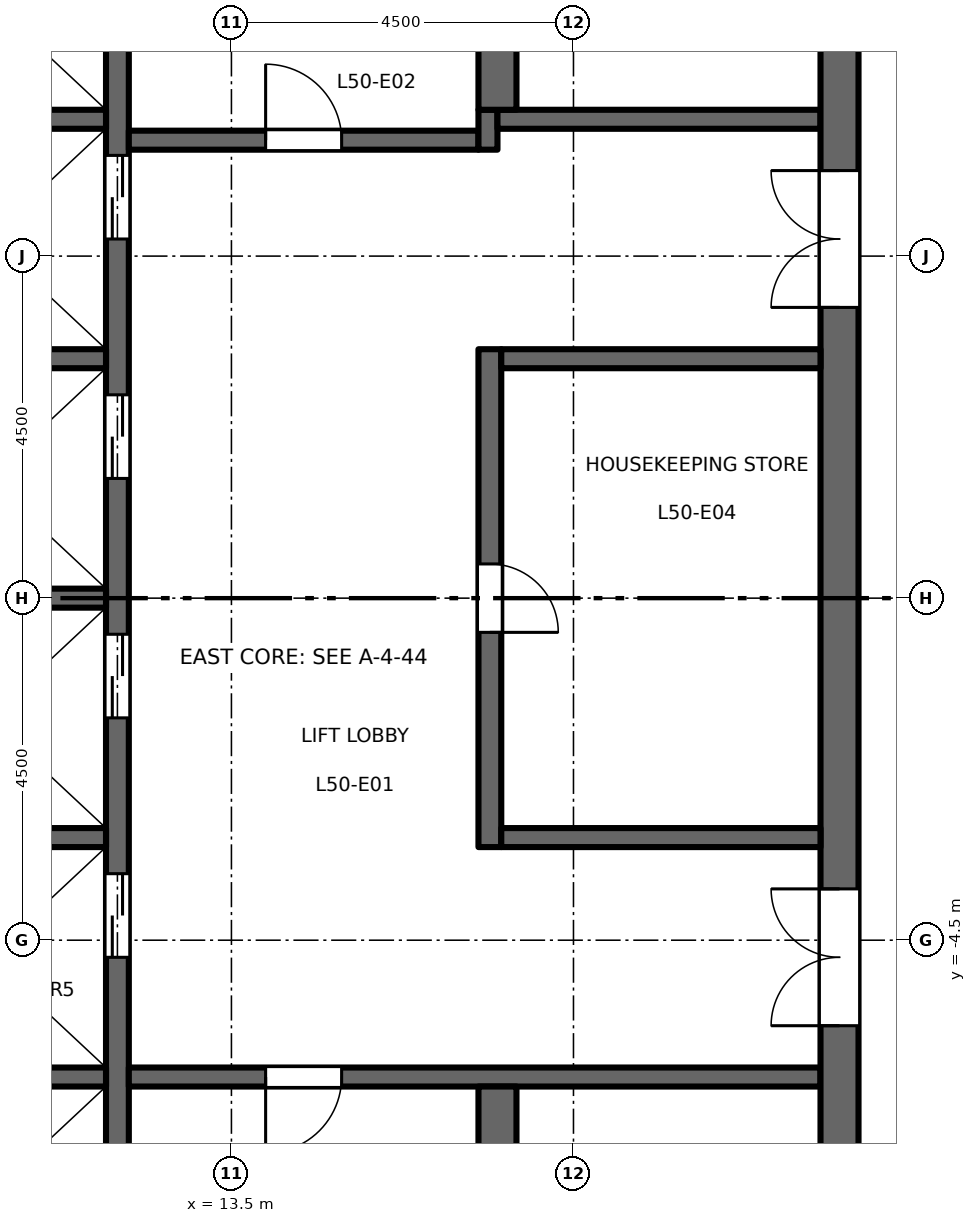
"""IFC4 building model, lengths in metres.
Left out: names, types, materials, properties, quantities, classifications, styles, units other than length and angle.
Written with IfcOpenShell. Run it as: python <this file> out.ifc"""

import sys

from ifc_helpers import new_model, si_unit, direction, frame, frame_2d, origin, place, context, subcontext, project, spatial, rectangle, extrude, element, fill, save


model = new_model("IFC4")
c1 = context("Model", 3, precision=1e-05, world=origin(), true_north=direction((0.0, 1.0)))
c2 = subcontext(c1, "Body", "Model", "MODEL_VIEW")
j1 = project(units=[si_unit("LENGTHUNIT", "METRE"), si_unit("PLANEANGLEUNIT", "RADIAN")], contexts=[c1])
p1 = place(None, origin())
s1 = spatial("IfcSite", under=j1, at=p1, CompositionType="ELEMENT")
p2 = place(p1, origin())
s2 = spatial("IfcBuilding", under=s1, at=p2, CompositionType="ELEMENT")
p3 = place(p2, frame((0.0, 0.0, 233.2)))
s3 = spatial("IfcBuildingStorey", under=s2, at=p3, CompositionType="ELEMENT", Elevation=233.2)
p4 = place(p3, frame((12.0, -9.45, 0.0), z_axis=(0.0, 0.0, 1.0), x_axis=(0.0, 1.0, 0.0)))
e1 = element("IfcWall", 1, at=p4, inside=s3, PredefinedType="SHEAR", context=c2, shape_type="SweptSolid", body=[
    extrude(rectangle(XDim=18.9, YDim=0.3, at=frame_2d((9.45, 0.0))), origin(), (0.0, 0.0, 1.0), 4.35),
])
p5 = place(p4, frame((4.725, 0.0, 0.0)))
e2 = element("IfcOpeningElement", 2, at=p5, cuts=e1, PredefinedType="OPENING", context=c2, shape_type="SweptSolid", body=[
    extrude(rectangle(XDim=1.1, YDim=2.1, at=frame_2d((0.55, 1.05))), frame((0.0, 0.16, 0.0), z_axis=(0.0, -1.0, 0.0), x_axis=(1.0, 0.0, 0.0)), (0.0, 0.0, 1.0), 0.32),
])
p6 = place(p4, frame((7.875, 0.0, 0.0)))
e3 = element("IfcOpeningElement", 3, at=p6, cuts=e1, PredefinedType="OPENING", context=c2, shape_type="SweptSolid", body=[
    extrude(rectangle(XDim=1.1, YDim=2.1, at=frame_2d((0.55, 1.05))), frame((0.0, 0.16, 0.0), z_axis=(0.0, -1.0, 0.0), x_axis=(1.0, 0.0, 0.0)), (0.0, 0.0, 1.0), 0.32),
])
p7 = place(p4, frame((11.025, 0.0, 0.0)))
e4 = element("IfcOpeningElement", 4, at=p7, cuts=e1, PredefinedType="OPENING", context=c2, shape_type="SweptSolid", body=[
    extrude(rectangle(XDim=1.1, YDim=2.1, at=frame_2d((0.55, 1.05))), frame((0.0, 0.16, 0.0), z_axis=(0.0, -1.0, 0.0), x_axis=(1.0, 0.0, 0.0)), (0.0, 0.0, 1.0), 0.32),
])
p8 = place(p4, frame((14.175, 0.0, 0.0)))
e5 = element("IfcOpeningElement", 5, at=p8, cuts=e1, PredefinedType="OPENING", context=c2, shape_type="SweptSolid", body=[
    extrude(rectangle(XDim=1.1, YDim=2.1, at=frame_2d((0.55, 1.05))), frame((0.0, 0.16, 0.0), z_axis=(0.0, -1.0, 0.0), x_axis=(1.0, 0.0, 0.0)), (0.0, 0.0, 1.0), 0.32),
])
p9 = place(p4, frame((16.725, 0.0, 0.0)))
e6 = element("IfcOpeningElement", 6, at=p9, cuts=e1, PredefinedType="OPENING", context=c2, shape_type="SweptSolid", body=[
    extrude(rectangle(XDim=1.2, YDim=2.1, at=frame_2d((0.6, 1.05))), frame((0.0, 0.16, 0.0), z_axis=(0.0, -1.0, 0.0), x_axis=(1.0, 0.0, 0.0)), (0.0, 0.0, 1.0), 0.32),
])
p10 = place(p4, frame((0.975, 0.0, 0.0)))
e7 = element("IfcOpeningElement", 7, at=p10, cuts=e1, PredefinedType="OPENING", context=c2, shape_type="SweptSolid", body=[
    extrude(rectangle(XDim=1.2, YDim=2.1, at=frame_2d((0.6, 1.05))), frame((0.0, 0.16, 0.0), z_axis=(0.0, -1.0, 0.0), x_axis=(1.0, 0.0, 0.0)), (0.0, 0.0, 1.0), 0.32),
])
p11 = place(p3, frame((12.15, 6.025, 0.0), z_axis=(0.0, 0.0, 1.0), x_axis=(1.0, 0.0, 0.0)))
e8 = element("IfcWall", 8, at=p11, inside=s3, PredefinedType="SHEAR", context=c2, shape_type="SweptSolid", body=[
    extrude(rectangle(XDim=4.6, YDim=0.25, at=frame_2d((2.3, 0.0))), origin(), (0.0, 0.0, 1.0), 4.35),
])
p12 = place(p11, frame((1.8, 0.0, 0.0)))
e9 = element("IfcOpeningElement", 9, at=p12, cuts=e8, PredefinedType="OPENING", context=c2, shape_type="SweptSolid", body=[
    extrude(rectangle(XDim=1.0, YDim=2.1, at=frame_2d((0.5, 1.05))), frame((0.0, 0.135, 0.0), z_axis=(0.0, -1.0, 0.0), x_axis=(1.0, 0.0, 0.0)), (0.0, 0.0, 1.0), 0.27),
])
p13 = place(p3, frame((16.875, 5.9, 0.0), z_axis=(0.0, 0.0, 1.0), x_axis=(0.0, 1.0, 0.0)))
e10 = element("IfcWall", 10, at=p13, inside=s3, PredefinedType="SHEAR", context=c2, shape_type="SweptSolid", body=[
    extrude(rectangle(XDim=0.525, YDim=0.25, at=frame_2d((0.263, 0.0))), origin(), (0.0, 0.0, 1.0), 4.35),
])
p14 = place(p3, frame((17.0, 6.3, 0.0), z_axis=(0.0, 0.0, 1.0), x_axis=(1.0, 0.0, 0.0)))
e11 = element("IfcWall", 11, at=p14, inside=s3, PredefinedType="SHEAR", context=c2, shape_type="SweptSolid", body=[
    extrude(rectangle(XDim=4.25, YDim=0.25, at=frame_2d((2.125, 0.0))), origin(), (0.0, 0.0, 1.0), 4.35),
])
p15 = place(p3, frame((12.15, -6.3, 0.0), z_axis=(0.0, 0.0, 1.0), x_axis=(1.0, 0.0, 0.0)))
e12 = element("IfcWall", 12, at=p15, inside=s3, PredefinedType="SHEAR", context=c2, shape_type="SweptSolid", body=[
    extrude(rectangle(XDim=9.1, YDim=0.25, at=frame_2d((4.55, 0.0))), origin(), (0.0, 0.0, 1.0), 4.35),
])
p16 = place(p15, frame((1.8, 0.0, 0.0)))
e13 = element("IfcOpeningElement", 13, at=p16, cuts=e12, PredefinedType="OPENING", context=c2, shape_type="SweptSolid", body=[
    extrude(rectangle(XDim=1.0, YDim=2.1, at=frame_2d((0.5, 1.05))), frame((0.0, 0.135, 0.0), z_axis=(0.0, -1.0, 0.0), x_axis=(1.0, 0.0, 0.0)), (0.0, 0.0, 1.0), 0.27),
])
p17 = place(p3, frame((21.5, -13.0, 0.0), z_axis=(0.0, 0.0, 1.0), x_axis=(0.0, 1.0, 0.0)))
e14 = element("IfcWall", 14, at=p17, inside=s3, PredefinedType="SHEAR", context=c2, shape_type="SweptSolid", body=[
    extrude(rectangle(XDim=26.0, YDim=0.5, at=frame_2d((13.0, 0.0))), origin(), (0.0, 0.0, 1.0), 4.35),
])
p18 = place(p17, frame((16.825, 0.0, 0.0)))
e15 = element("IfcOpeningElement", 15, at=p18, cuts=e14, PredefinedType="OPENING", context=c2, shape_type="SweptSolid", body=[
    extrude(rectangle(XDim=1.8, YDim=2.1, at=frame_2d((0.9, 1.05))), frame((0.0, 0.26, 0.0), z_axis=(0.0, -1.0, 0.0), x_axis=(1.0, 0.0, 0.0)), (0.0, 0.0, 1.0), 0.52),
])
p19 = place(p17, frame((7.375, 0.0, 0.0)))
e16 = element("IfcOpeningElement", 16, at=p19, cuts=e14, PredefinedType="OPENING", context=c2, shape_type="SweptSolid", body=[
    extrude(rectangle(XDim=1.8, YDim=2.1, at=frame_2d((0.9, 1.05))), frame((0.0, 0.26, 0.0), z_axis=(0.0, -1.0, 0.0), x_axis=(1.0, 0.0, 0.0)), (0.0, 0.0, 1.0), 0.52),
])
p20 = place(p3, frame((16.9, -3.275, 0.0), z_axis=(0.0, 0.0, 1.0), x_axis=(0.0, 1.0, 0.0)))
e17 = element("IfcWall", 17, at=p20, inside=s3, PredefinedType="SHEAR", context=c2, shape_type="SweptSolid", body=[
    extrude(rectangle(XDim=6.55, YDim=0.3, at=frame_2d((3.275, 0.0))), origin(), (0.0, 0.0, 1.0), 4.35),
])
p21 = place(p20, frame((2.825, 0.0, 0.0)))
e18 = element("IfcOpeningElement", 18, at=p21, cuts=e17, PredefinedType="OPENING", context=c2, shape_type="SweptSolid", body=[
    extrude(rectangle(XDim=0.9, YDim=2.1, at=frame_2d((0.45, 1.05))), frame((0.0, 0.16, 0.0), z_axis=(0.0, -1.0, 0.0), x_axis=(1.0, 0.0, 0.0)), (0.0, 0.0, 1.0), 0.32),
])
for number, where, z_axis, x_axis in (
    (19, (17.05, 3.15, 0.0), (0.0, 0.0, 1.0), (1.0, 0.0, 0.0)),
    (20, (17.05, -3.15, 0.0), (0.0, 0.0, 1.0), (1.0, 0.0, 0.0)),
):
    element("IfcWall", number, at=place(p3, frame(where, z_axis=z_axis, x_axis=x_axis)), inside=s3, PredefinedType="SHEAR", context=c2, shape_type="SweptSolid", body=[
        extrude(rectangle(XDim=4.2, YDim=0.25, at=frame_2d((2.1, 0.0))), origin(), (0.0, 0.0, 1.0), 4.35),
    ])
for number, where, z_axis, x_axis in (
    (21, (17.0, 6.425, 0.0), (0.0, 0.0, 1.0), (0.0, 1.0, 0.0)),
    (22, (17.0, -13.0, 0.0), (0.0, 0.0, 1.0), (0.0, 1.0, 0.0)),
):
    element("IfcWall", number, at=place(p3, frame(where, z_axis=z_axis, x_axis=x_axis)), inside=s3, PredefinedType="SHEAR", context=c2, shape_type="SweptSolid", body=[
        extrude(rectangle(XDim=6.575, YDim=0.5, at=frame_2d((3.288, 0.0))), origin(), (0.0, 0.0, 1.0), 4.35),
    ])
for number, where, z_axis, x_axis in (
    (23, (8.75, 0.0, 0.0), (0.0, 0.0, 1.0), (1.0, 0.0, 0.0)),
    (24, (8.75, 3.15, 0.0), (0.0, 0.0, 1.0), (1.0, 0.0, 0.0)),
    (25, (8.75, 6.3, 0.0), (0.0, 0.0, 1.0), (1.0, 0.0, 0.0)),
    (26, (8.75, -3.15, 0.0), (0.0, 0.0, 1.0), (1.0, 0.0, 0.0)),
    (27, (8.75, -6.3, 0.0), (0.0, 0.0, 1.0), (1.0, 0.0, 0.0)),
):
    element("IfcWall", number, at=place(p3, frame(where, z_axis=z_axis, x_axis=x_axis)), inside=s3, PredefinedType="SHEAR", context=c2, shape_type="SweptSolid", body=[
        extrude(rectangle(XDim=3.1, YDim=0.25, at=frame_2d((1.55, 0.0))), origin(), (0.0, 0.0, 1.0), 4.35),
    ])
p22 = place(p12, origin())
e28 = element("IfcDoor", 28, at=p22, inside=s3, OperationType="SINGLE_SWING_RIGHT", PredefinedType="DOOR", context=c2, shape_type="SweptSolid", body=[
    extrude(rectangle(XDim=1.0, YDim=2.1, at=frame_2d((0.5, 1.05))), frame((0.0, 0.025, 0.0), z_axis=(0.0, -1.0, 0.0), x_axis=(1.0, 0.0, 0.0)), (0.0, 0.0, 1.0), 0.05),
])
fill(e9, e28)
p23 = place(p16, origin())
e29 = element("IfcDoor", 29, at=p23, inside=s3, OperationType="SINGLE_SWING_LEFT", PredefinedType="DOOR", context=c2, shape_type="SweptSolid", body=[
    extrude(rectangle(XDim=1.0, YDim=2.1, at=frame_2d((0.5, 1.05))), frame((0.0, 0.025, 0.0), z_axis=(0.0, -1.0, 0.0), x_axis=(1.0, 0.0, 0.0)), (0.0, 0.0, 1.0), 0.05),
])
fill(e13, e29)
p24 = place(p18, origin())
e30 = element("IfcDoor", 30, at=p24, inside=s3, OperationType="DOUBLE_DOOR_DOUBLE_SWING", PredefinedType="DOOR", context=c2, shape_type="SweptSolid", body=[
    extrude(rectangle(XDim=1.8, YDim=2.1, at=frame_2d((0.9, 1.05))), frame((0.0, 0.025, 0.0), z_axis=(0.0, -1.0, 0.0), x_axis=(1.0, 0.0, 0.0)), (0.0, 0.0, 1.0), 0.05),
])
fill(e15, e30)
p25 = place(p19, origin())
e31 = element("IfcDoor", 31, at=p25, inside=s3, OperationType="DOUBLE_DOOR_DOUBLE_SWING", PredefinedType="DOOR", context=c2, shape_type="SweptSolid", body=[
    extrude(rectangle(XDim=1.8, YDim=2.1, at=frame_2d((0.9, 1.05))), frame((0.0, 0.025, 0.0), z_axis=(0.0, -1.0, 0.0), x_axis=(1.0, 0.0, 0.0)), (0.0, 0.0, 1.0), 0.05),
])
fill(e16, e31)
p26 = place(p5, origin())
e32 = element("IfcDoor", 32, at=p26, inside=s3, OperationType="DOUBLE_DOOR_SLIDING", PredefinedType="DOOR", context=c2, shape_type="SweptSolid", body=[
    extrude(rectangle(XDim=1.1, YDim=2.1, at=frame_2d((0.55, 1.05))), frame((0.0, 0.025, 0.0), z_axis=(0.0, -1.0, 0.0), x_axis=(1.0, 0.0, 0.0)), (0.0, 0.0, 1.0), 0.05),
])
fill(e2, e32)
p27 = place(p6, origin())
e33 = element("IfcDoor", 33, at=p27, inside=s3, OperationType="DOUBLE_DOOR_SLIDING", PredefinedType="DOOR", context=c2, shape_type="SweptSolid", body=[
    extrude(rectangle(XDim=1.1, YDim=2.1, at=frame_2d((0.55, 1.05))), frame((0.0, 0.025, 0.0), z_axis=(0.0, -1.0, 0.0), x_axis=(1.0, 0.0, 0.0)), (0.0, 0.0, 1.0), 0.05),
])
fill(e3, e33)
p28 = place(p7, origin())
e34 = element("IfcDoor", 34, at=p28, inside=s3, OperationType="DOUBLE_DOOR_SLIDING", PredefinedType="DOOR", context=c2, shape_type="SweptSolid", body=[
    extrude(rectangle(XDim=1.1, YDim=2.1, at=frame_2d((0.55, 1.05))), frame((0.0, 0.025, 0.0), z_axis=(0.0, -1.0, 0.0), x_axis=(1.0, 0.0, 0.0)), (0.0, 0.0, 1.0), 0.05),
])
fill(e4, e34)
p29 = place(p8, origin())
e35 = element("IfcDoor", 35, at=p29, inside=s3, OperationType="DOUBLE_DOOR_SLIDING", PredefinedType="DOOR", context=c2, shape_type="SweptSolid", body=[
    extrude(rectangle(XDim=1.1, YDim=2.1, at=frame_2d((0.55, 1.05))), frame((0.0, 0.025, 0.0), z_axis=(0.0, -1.0, 0.0), x_axis=(1.0, 0.0, 0.0)), (0.0, 0.0, 1.0), 0.05),
])
fill(e5, e35)
p30 = place(p21, origin())
e36 = element("IfcDoor", 36, at=p30, inside=s3, OperationType="SINGLE_SWING_LEFT", PredefinedType="DOOR", context=c2, shape_type="SweptSolid", body=[
    extrude(rectangle(XDim=0.9, YDim=2.1, at=frame_2d((0.45, 1.05))), frame((0.0, 0.025, 0.0), z_axis=(0.0, -1.0, 0.0), x_axis=(1.0, 0.0, 0.0)), (0.0, 0.0, 1.0), 0.05),
])
fill(e18, e36)
save(model, sys.argv[1])
